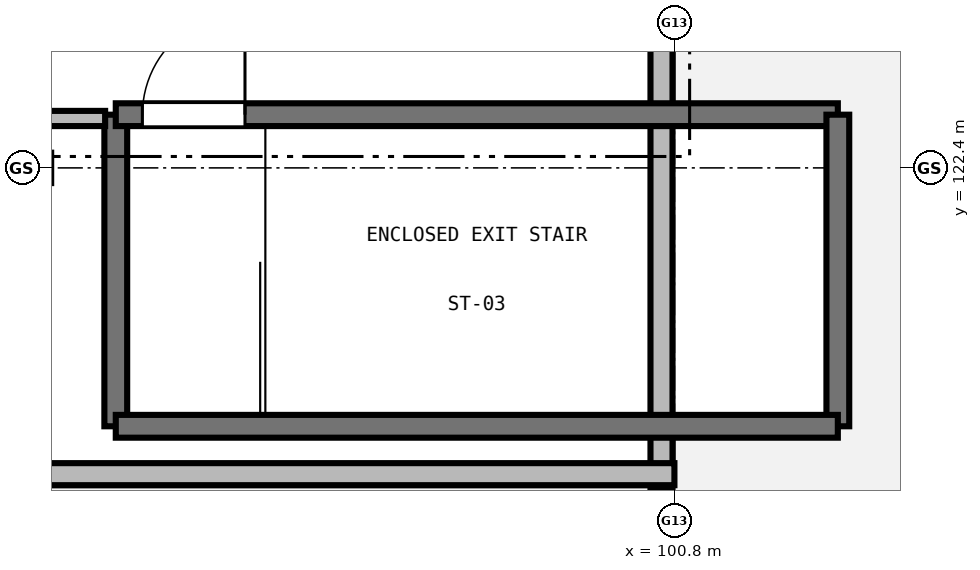
"""IFC4 building model, lengths in metres.
Left out: names, types, materials, properties, quantities, classifications, styles, units other than length and angle.
Written with IfcOpenShell. Run it as: python <this file> out.ifc"""

import sys

from ifc_helpers import new_model, si_unit, direction, frame, frame_2d, origin, place, context, subcontext, project, spatial, rectangle, extrude, element, fill, save


model = new_model("IFC4")
c1 = context("Model", 3, precision=1e-05, world=origin(), true_north=direction((0.0, 1.0)))
c2 = subcontext(c1, "Body", "Model", "MODEL_VIEW")
j1 = project(units=[si_unit("LENGTHUNIT", "METRE"), si_unit("PLANEANGLEUNIT", "RADIAN")], contexts=[c1])
p1 = place(None, origin())
s1 = spatial("IfcSite", under=j1, at=p1, CompositionType="ELEMENT")
p2 = place(p1, origin())
s2 = spatial("IfcBuilding", under=s1, at=p2, CompositionType="ELEMENT")
p3 = place(p2, frame((0.0, 0.0, 21.9)))
s3 = spatial("IfcBuildingStorey", under=s2, at=p3, CompositionType="ELEMENT", Elevation=21.9)
p4 = place(p3, frame((100.63, 129.377, 0.0), z_axis=(0.0, 0.0, 1.0), x_axis=(0.0, -1.0, 0.0)))
e1 = element("IfcWall", 1, at=p4, inside=s3, PredefinedType="SOLIDWALL", context=c2, shape_type="SweptSolid", body=[
    extrude(rectangle(XDim=11.177, YDim=0.29, at=frame_2d((5.588, 0.0))), origin(), (0.0, 0.0, 1.0), 3.86),
])
p5 = place(p4, frame((1.277, 0.0, 0.0)))
e2 = element("IfcOpeningElement", 2, at=p5, cuts=e1, PredefinedType="OPENING", context=c2, shape_type="SweptSolid", body=[
    extrude(rectangle(XDim=1.8, YDim=2.2, at=frame_2d((0.9, 1.1))), frame((0.0, 0.155, 0.0), z_axis=(0.0, -1.0, 0.0), x_axis=(1.0, 0.0, 0.0)), (0.0, 0.0, 1.0), 0.31),
])
p6 = place(p3, frame((100.8, 118.37, 0.0), z_axis=(0.0, 0.0, 1.0), x_axis=(-1.0, 0.0, 0.0)))
e3 = element("IfcWall", 3, at=p6, inside=s3, PredefinedType="SOLIDWALL", context=c2, shape_type="SweptSolid", body=[
    extrude(rectangle(XDim=100.8, YDim=0.29, at=frame_2d((50.4, 0.0))), origin(), (0.0, 0.0, 1.0), 3.86),
])
p7 = place(p6, frame((53.8, 0.0, 0.0)))
e4 = element("IfcOpeningElement", 4, at=p7, cuts=e3, PredefinedType="OPENING", context=c2, shape_type="SweptSolid", body=[
    extrude(rectangle(XDim=1.6, YDim=2.2, at=frame_2d((0.8, 1.1))), frame((0.0, 0.155, 0.0), z_axis=(0.0, -1.0, 0.0), x_axis=(1.0, 0.0, 0.0)), (0.0, 0.0, 1.0), 0.31),
])
p8 = place(p6, frame((20.2, 0.0, 0.0)))
e5 = element("IfcOpeningElement", 5, at=p8, cuts=e3, PredefinedType="OPENING", context=c2, shape_type="SweptSolid", body=[
    extrude(rectangle(XDim=1.6, YDim=2.2, at=frame_2d((0.8, 1.1))), frame((0.0, 0.155, 0.0), z_axis=(0.0, -1.0, 0.0), x_axis=(1.0, 0.0, 0.0)), (0.0, 0.0, 1.0), 0.31),
])
p9 = place(p3, frame((93.45, 119.0, 0.0), z_axis=(0.0, 0.0, 1.0), x_axis=(0.0, 1.0, 0.0)))
e6 = element("IfcWall", 6, at=p9, inside=s3, PredefinedType="SHEAR", context=c2, shape_type="SweptSolid", body=[
    extrude(rectangle(XDim=4.1, YDim=0.3, at=frame_2d((2.05, 0.0))), origin(), (0.0, 0.0, 1.0), 3.88),
])
p10 = place(p3, frame((93.45, 123.1, 0.0), z_axis=(0.0, 0.0, 1.0), x_axis=(1.0, 0.0, 0.0)))
e7 = element("IfcWall", 7, at=p10, inside=s3, PredefinedType="SHEAR", context=c2, shape_type="SweptSolid", body=[
    extrude(rectangle(XDim=9.5, YDim=0.3, at=frame_2d((4.75, 0.0))), origin(), (0.0, 0.0, 1.0), 3.88),
])
p11 = place(p10, frame((0.35, 0.0, 0.0)))
e8 = element("IfcOpeningElement", 8, at=p11, cuts=e7, PredefinedType="OPENING", context=c2, shape_type="SweptSolid", body=[
    extrude(rectangle(XDim=1.35, YDim=2.2, at=frame_2d((0.675, 1.1))), frame((0.0, 0.16, 0.0), z_axis=(0.0, -1.0, 0.0), x_axis=(1.0, 0.0, 0.0)), (0.0, 0.0, 1.0), 0.32),
])
p12 = place(p3, frame((102.95, 123.1, 0.0), z_axis=(0.0, 0.0, 1.0), x_axis=(0.0, -1.0, 0.0)))
e9 = element("IfcWall", 9, at=p12, inside=s3, PredefinedType="SHEAR", context=c2, shape_type="SweptSolid", body=[
    extrude(rectangle(XDim=4.1, YDim=0.3, at=frame_2d((2.05, 0.0))), origin(), (0.0, 0.0, 1.0), 3.88),
])
p13 = place(p3, frame((102.95, 119.0, 0.0), z_axis=(0.0, 0.0, 1.0), x_axis=(-1.0, 0.0, 0.0)))
e10 = element("IfcWall", 10, at=p13, inside=s3, PredefinedType="SHEAR", context=c2, shape_type="SweptSolid", body=[
    extrude(rectangle(XDim=9.5, YDim=0.3, at=frame_2d((4.75, 0.0))), origin(), (0.0, 0.0, 1.0), 3.88),
])
p14 = place(p3, frame((93.31, 123.05, 0.0), z_axis=(0.0, 0.0, 1.0), x_axis=(-1.0, 0.0, 0.0)))
e11 = element("IfcWall", 11, at=p14, inside=s3, PredefinedType="SOLIDWALL", context=c2, shape_type="SweptSolid", body=[
    extrude(rectangle(XDim=32.22, YDim=0.2, at=frame_2d((16.11, 0.0))), origin(), (0.0, 0.0, 1.0), 3.455),
])
p15 = place(p14, frame((27.71, 0.0, 0.0)))
e12 = element("IfcOpeningElement", 12, at=p15, cuts=e11, PredefinedType="OPENING", context=c2, shape_type="SweptSolid", body=[
    extrude(rectangle(XDim=1.0, YDim=2.1, at=frame_2d((0.5, 1.05))), frame((0.0, 0.11, 0.0), z_axis=(0.0, -1.0, 0.0), x_axis=(1.0, 0.0, 0.0)), (0.0, 0.0, 1.0), 0.22),
])
p16 = place(p11, origin())
e13 = element("IfcDoor", 13, at=p16, inside=s3, OperationType="SINGLE_SWING_RIGHT", PredefinedType="DOOR", context=c2, shape_type="SweptSolid", body=[
    extrude(rectangle(XDim=1.35, YDim=2.2, at=frame_2d((0.675, 1.1))), frame((0.0, 0.025, 0.0), z_axis=(0.0, -1.0, 0.0), x_axis=(1.0, 0.0, 0.0)), (0.0, 0.0, 1.0), 0.05),
])
fill(e8, e13)
save(model, sys.argv[1])
